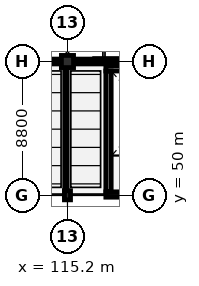
"""IFC4 building model, lengths in metres.
Left out: names, types, materials, properties, quantities, classifications, styles, units other than length and angle.
Written with IfcOpenShell. Run it as: python <this file> out.ifc"""

import sys

from ifc_helpers import new_model, si_unit, direction, frame, frame_2d, origin, origin_2d, place, context, subcontext, project, spatial, polyline, rectangle, outline, extrude, element, fill, save


model = new_model("IFC4")
c1 = context("Model", 3, precision=1e-05, world=origin(), true_north=direction((0.0, 1.0)))
c2 = subcontext(c1, "Body", "Model", "MODEL_VIEW")
j1 = project(units=[si_unit("LENGTHUNIT", "METRE"), si_unit("PLANEANGLEUNIT", "RADIAN")], contexts=[c1])
p1 = place(None, origin())
s1 = spatial("IfcSite", under=j1, at=p1, CompositionType="ELEMENT")
p2 = place(p1, origin())
s2 = spatial("IfcBuilding", under=s1, at=p2, CompositionType="ELEMENT")
p3 = place(p2, frame((0.0, 0.0, 9.6)))
s3 = spatial("IfcBuildingStorey", under=s2, at=p3, CompositionType="ELEMENT", Elevation=9.6)
p4 = place(p3, frame((115.2, 50.0, 0.0), z_axis=(0.0, 0.0, 1.0), x_axis=(1.0, 0.0, 0.0)))
e1 = element("IfcColumn", 1, at=p4, inside=s3, PredefinedType="COLUMN", context=c2, shape_type="SweptSolid", body=[
    extrude(rectangle(XDim=0.4, YDim=0.6, at=origin_2d()), origin(), (0.0, 0.0, 1.0), 4.5),
])
p5 = place(p3, frame((115.2, 58.8, 0.0), z_axis=(0.0, 0.0, 1.0), x_axis=(1.0, 0.0, 0.0)))
e2 = element("IfcColumn", 2, at=p5, inside=s3, PredefinedType="COLUMN", context=c2, shape_type="SweptSolid", body=[
    extrude(rectangle(XDim=0.8, YDim=0.8, at=origin_2d()), origin(), (0.0, 0.0, 1.0), 4.5),
])
p6 = place(p3, frame((106.0, 58.8, 0.0), z_axis=(0.0, 0.0, 1.0), x_axis=(1.0, 0.0, 0.0)))
e3 = element("IfcWall", 3, at=p6, inside=s3, PredefinedType="STANDARD", context=c2, shape_type="SweptSolid", body=[
    extrude(rectangle(XDim=8.8, YDim=0.3, at=frame_2d((4.4, 0.0))), origin(), (0.0, 0.0, 1.0), 1.85),
])
p7 = place(p3, frame((106.0, 58.8, 2.38), z_axis=(0.0, 0.0, 1.0), x_axis=(1.0, 0.0, 0.0)))
e4 = element("IfcWall", 4, at=p7, inside=s3, PredefinedType="STANDARD", context=c2, shape_type="SweptSolid", body=[
    extrude(outline(polyline([(0.0, 0.0), (8.8, 0.0), (8.8, 3.267), (0.0, 3.705), (0.0, 0.0)])), frame((0.0, 0.15, 0.0), z_axis=(0.0, -1.0, 0.0), x_axis=(1.0, 0.0, 0.0)), (0.0, 0.0, 1.0), 0.3),
])
p8 = place(p7, frame((0.85, 0.0, 0.25)))
e5 = element("IfcOpeningElement", 5, at=p8, cuts=e4, PredefinedType="OPENING", context=c2, shape_type="SweptSolid", body=[
    extrude(rectangle(XDim=0.67, YDim=2.29, at=frame_2d((0.335, 1.145))), frame((0.0, 0.16, 0.0), z_axis=(0.0, -1.0, 0.0), x_axis=(1.0, 0.0, 0.0)), (0.0, 0.0, 1.0), 0.32),
])
p9 = place(p7, frame((2.9, 0.0, 0.25)))
e6 = element("IfcOpeningElement", 6, at=p9, cuts=e4, PredefinedType="OPENING", context=c2, shape_type="SweptSolid", body=[
    extrude(rectangle(XDim=0.63, YDim=2.26, at=frame_2d((0.315, 1.13))), frame((0.0, 0.16, 0.0), z_axis=(0.0, -1.0, 0.0), x_axis=(1.0, 0.0, 0.0)), (0.0, 0.0, 1.0), 0.32),
])
p10 = place(p7, frame((4.95, 0.0, 0.25)))
e7 = element("IfcOpeningElement", 7, at=p10, cuts=e4, PredefinedType="OPENING", context=c2, shape_type="SweptSolid", body=[
    extrude(rectangle(XDim=0.75, YDim=2.35, at=frame_2d((0.375, 1.175))), frame((0.0, 0.16, 0.0), z_axis=(0.0, -1.0, 0.0), x_axis=(1.0, 0.0, 0.0)), (0.0, 0.0, 1.0), 0.32),
])
p11 = place(p7, frame((7.0, 0.0, 0.25)))
e8 = element("IfcOpeningElement", 8, at=p11, cuts=e4, PredefinedType="OPENING", context=c2, shape_type="SweptSolid", body=[
    extrude(rectangle(XDim=0.71, YDim=2.32, at=frame_2d((0.355, 1.16))), frame((0.0, 0.16, 0.0), z_axis=(0.0, -1.0, 0.0), x_axis=(1.0, 0.0, 0.0)), (0.0, 0.0, 1.0), 0.32),
])
p12 = place(p3, frame((115.6, 58.8, 0.0), z_axis=(0.0, 0.0, 1.0), x_axis=(1.0, 0.0, 0.0)))
e9 = element("IfcWall", 9, at=p12, inside=s3, PredefinedType="STANDARD", context=c2, shape_type="SweptSolid", body=[
    extrude(rectangle(XDim=8.8, YDim=0.3, at=frame_2d((4.4, 0.0))), origin(), (0.0, 0.0, 1.0), 1.85),
])
p13 = place(p3, frame((115.6, 58.8, 2.38), z_axis=(0.0, 0.0, 1.0), x_axis=(1.0, 0.0, 0.0)))
e10 = element("IfcWall", 10, at=p13, inside=s3, PredefinedType="STANDARD", context=c2, shape_type="SweptSolid", body=[
    extrude(outline(polyline([(0.0, 0.0), (8.8, 0.0), (8.8, 2.75), (0.0, 3.267), (0.0, 0.0)])), frame((0.0, 0.15, 0.0), z_axis=(0.0, -1.0, 0.0), x_axis=(1.0, 0.0, 0.0)), (0.0, 0.0, 1.0), 0.3),
])
p14 = place(p13, frame((0.85, 0.0, 0.25)))
e11 = element("IfcOpeningElement", 11, at=p14, cuts=e10, PredefinedType="OPENING", context=c2, shape_type="SweptSolid", body=[
    extrude(rectangle(XDim=0.67, YDim=2.29, at=frame_2d((0.335, 1.145))), frame((0.0, 0.16, 0.0), z_axis=(0.0, -1.0, 0.0), x_axis=(1.0, 0.0, 0.0)), (0.0, 0.0, 1.0), 0.32),
])
p15 = place(p13, frame((2.9, 0.0, 0.25)))
e12 = element("IfcOpeningElement", 12, at=p15, cuts=e10, PredefinedType="OPENING", context=c2, shape_type="SweptSolid", body=[
    extrude(rectangle(XDim=0.63, YDim=2.26, at=frame_2d((0.315, 1.13))), frame((0.0, 0.16, 0.0), z_axis=(0.0, -1.0, 0.0), x_axis=(1.0, 0.0, 0.0)), (0.0, 0.0, 1.0), 0.32),
])
p16 = place(p13, frame((4.95, 0.0, 0.25)))
e13 = element("IfcOpeningElement", 13, at=p16, cuts=e10, PredefinedType="OPENING", context=c2, shape_type="SweptSolid", body=[
    extrude(rectangle(XDim=0.75, YDim=2.35, at=frame_2d((0.375, 1.175))), frame((0.0, 0.16, 0.0), z_axis=(0.0, -1.0, 0.0), x_axis=(1.0, 0.0, 0.0)), (0.0, 0.0, 1.0), 0.32),
])
p17 = place(p13, frame((7.0, 0.0, 0.25)))
e14 = element("IfcOpeningElement", 14, at=p17, cuts=e10, PredefinedType="OPENING", context=c2, shape_type="SweptSolid", body=[
    extrude(rectangle(XDim=0.71, YDim=2.32, at=frame_2d((0.355, 1.16))), frame((0.0, 0.16, 0.0), z_axis=(0.0, -1.0, 0.0), x_axis=(1.0, 0.0, 0.0)), (0.0, 0.0, 1.0), 0.32),
])
for number, where, z_axis, x_axis in (
    (15, (123.375, 50.05, 0.0), (0.0, 0.0, 1.0), (-1.0, 0.0, 0.0)),
    (16, (117.725, 58.35, 0.0), (0.0, 0.0, 1.0), (1.0, 0.0, 0.0)),
):
    element("IfcWall", number, at=place(p3, frame(where, z_axis=z_axis, x_axis=x_axis)), inside=s3, PredefinedType="SHEAR", context=c2, shape_type="SweptSolid", body=[
        extrude(rectangle(XDim=5.65, YDim=0.35, at=frame_2d((2.825, 0.0))), origin(), (0.0, 0.0, 1.0), 3.85),
    ])
p18 = place(p3, frame((117.9, 50.225, 0.0), z_axis=(0.0, 0.0, 1.0), x_axis=(0.0, 1.0, 0.0)))
e17 = element("IfcWall", 17, at=p18, inside=s3, PredefinedType="SHEAR", context=c2, shape_type="SweptSolid", body=[
    extrude(rectangle(XDim=7.95, YDim=0.35, at=frame_2d((3.975, 0.0))), origin(), (0.0, 0.0, 1.0), 3.85),
])
p19 = place(p18, frame((0.22, 0.0, 0.0)))
e18 = element("IfcOpeningElement", 18, at=p19, cuts=e17, PredefinedType="OPENING", context=c2, shape_type="SweptSolid", body=[
    extrude(rectangle(XDim=2.05, YDim=2.15, at=frame_2d((1.025, 1.075))), frame((0.0, 0.185, 0.0), z_axis=(0.0, -1.0, 0.0), x_axis=(1.0, 0.0, 0.0)), (0.0, 0.0, 1.0), 0.37),
])
p20 = place(p3, frame((115.1, 49.95, 0.0), z_axis=(0.0, 0.0, 1.0), x_axis=(0.0, 1.0, 0.0)))
e19 = element("IfcWall", 19, at=p20, inside=s3, PredefinedType="PARTITIONING", context=c2, shape_type="SweptSolid", body=[
    extrude(rectangle(XDim=8.8, YDim=0.16, at=frame_2d((4.4, 0.0))), origin(), (0.0, 0.0, 1.0), 2.4),
])
p21 = place(p20, frame((3.5, 0.0, 0.0)))
e20 = element("IfcOpeningElement", 20, at=p21, cuts=e19, PredefinedType="OPENING", context=c2, shape_type="SweptSolid", body=[
    extrude(rectangle(XDim=1.8, YDim=2.15, at=frame_2d((0.9, 1.075))), frame((0.0, 0.09, 0.0), z_axis=(0.0, -1.0, 0.0), x_axis=(1.0, 0.0, 0.0)), (0.0, 0.0, 1.0), 0.18),
])
p22 = place(p14, origin())
e21 = element("IfcWindow", 21, at=p22, inside=s3, PartitioningType="SINGLE_PANEL", PredefinedType="WINDOW", context=c2, shape_type="SweptSolid", body=[
    extrude(rectangle(XDim=0.67, YDim=2.29, at=frame_2d((0.335, 1.145))), frame((0.0, 0.03, 0.0), z_axis=(0.0, -1.0, 0.0), x_axis=(1.0, 0.0, 0.0)), (0.0, 0.0, 1.0), 0.06),
])
fill(e11, e21)
p23 = place(p15, origin())
e22 = element("IfcWindow", 22, at=p23, inside=s3, PartitioningType="SINGLE_PANEL", PredefinedType="WINDOW", context=c2, shape_type="SweptSolid", body=[
    extrude(rectangle(XDim=0.63, YDim=2.26, at=frame_2d((0.315, 1.13))), frame((0.0, 0.03, 0.0), z_axis=(0.0, -1.0, 0.0), x_axis=(1.0, 0.0, 0.0)), (0.0, 0.0, 1.0), 0.06),
])
fill(e12, e22)
p24 = place(p19, origin())
e23 = element("IfcDoor", 23, at=p24, inside=s3, OperationType="DOUBLE_DOOR_SINGLE_SWING", PredefinedType="DOOR", context=c2, shape_type="SweptSolid", body=[
    extrude(rectangle(XDim=2.05, YDim=2.15, at=frame_2d((1.025, 1.075))), frame((0.0, 0.025, 0.0), z_axis=(0.0, -1.0, 0.0), x_axis=(1.0, 0.0, 0.0)), (0.0, 0.0, 1.0), 0.05),
])
fill(e18, e23)
p25 = place(p21, origin())
e24 = element("IfcDoor", 24, at=p25, inside=s3, OperationType="DOUBLE_DOOR_SINGLE_SWING", PredefinedType="DOOR", context=c2, shape_type="SweptSolid", body=[
    extrude(rectangle(XDim=1.8, YDim=2.15, at=frame_2d((0.9, 1.075))), frame((0.0, 0.025, 0.0), z_axis=(0.0, -1.0, 0.0), x_axis=(1.0, 0.0, 0.0)), (0.0, 0.0, 1.0), 0.05),
])
fill(e20, e24)
save(model, sys.argv[1])
